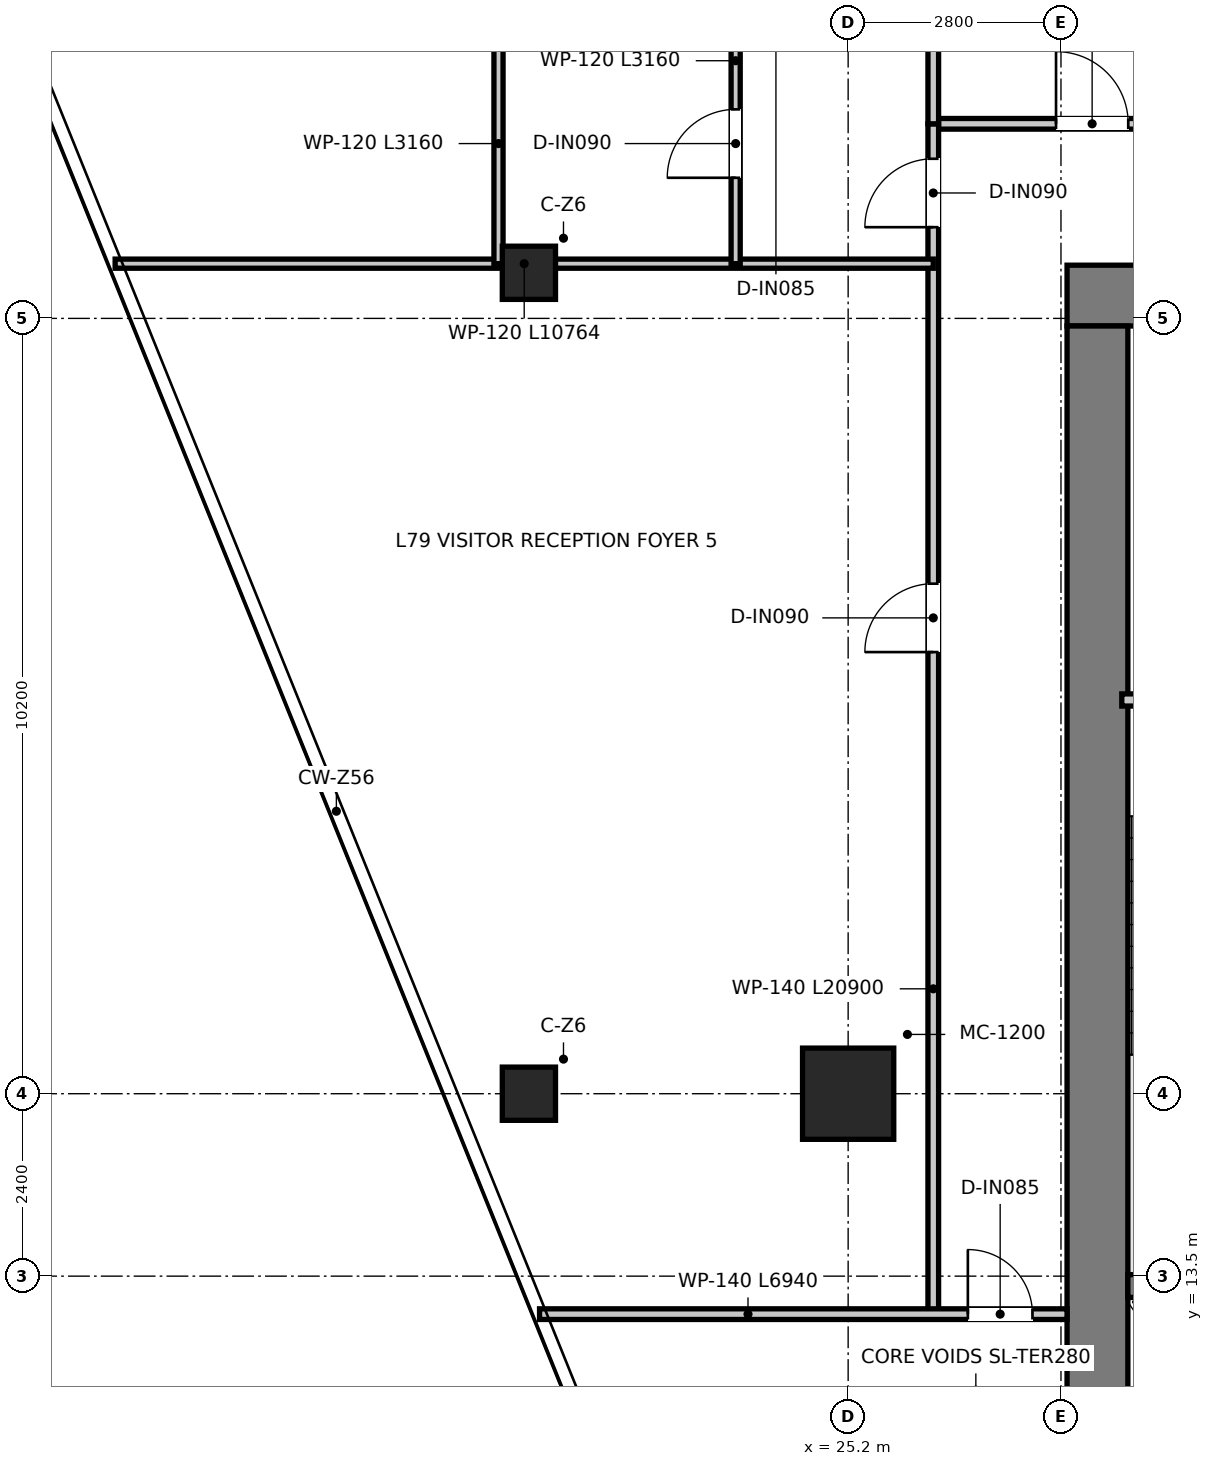
"""IFC4 building model, lengths in metres.
Left out: names, types, materials, properties, quantities, classifications, styles, units other than length and angle.
Written with IfcOpenShell. Run it as: python <this file> out.ifc"""

import sys

from ifc_helpers import new_model, si_unit, direction, frame, frame_2d, origin, origin_2d, place, context, subcontext, project, spatial, rectangle, extrude, source, transform, mapped, element, fill, save


model = new_model("IFC4")
c1 = context("Model", 3, precision=1e-05, world=origin(), true_north=direction((0.0, 1.0)))
c2 = subcontext(c1, "Body", "Model", "MODEL_VIEW")
j1 = project(units=[si_unit("LENGTHUNIT", "METRE"), si_unit("PLANEANGLEUNIT", "RADIAN")], contexts=[c1])
p1 = place(None, origin())
s1 = spatial("IfcSite", under=j1, at=p1, CompositionType="ELEMENT")
p2 = place(p1, origin())
s2 = spatial("IfcBuilding", under=s1, at=p2, CompositionType="ELEMENT")
p3 = place(p2, frame((0.0, 0.0, 323.75)))
s3 = spatial("IfcBuildingStorey", under=s2, at=p3, CompositionType="ELEMENT", Elevation=323.75)
p4 = place(p3, frame((28.08, 26.4, 0.0), z_axis=(0.0, 0.0, 1.0), x_axis=(1.0, 0.0, 0.0)))
e1 = element("IfcWall", 1, at=p4, inside=s3, PredefinedType="SHEAR", context=c2, shape_type="SweptSolid", body=[
    extrude(rectangle(XDim=15.84, YDim=0.8, at=frame_2d((7.92, 0.0))), origin(), (0.0, 0.0, 1.0), 3.95),
])
p5 = place(p4, frame((7.22, 0.0, 0.0)))
e2 = element("IfcOpeningElement", 2, at=p5, cuts=e1, PredefinedType="OPENING", context=c2, shape_type="SweptSolid", body=[
    extrude(rectangle(XDim=1.4, YDim=2.2, at=frame_2d((0.7, 1.1))), frame((0.0, 0.41, 0.0), z_axis=(0.0, -1.0, 0.0), x_axis=(1.0, 0.0, 0.0)), (0.0, 0.0, 1.0), 0.82),
])
p6 = place(p4, frame((1.775, 0.0, 0.0)))
e3 = element("IfcOpeningElement", 3, at=p6, cuts=e1, PredefinedType="OPENING", context=c2, shape_type="SweptSolid", body=[
    extrude(rectangle(XDim=1.05, YDim=2.1, at=frame_2d((0.525, 1.05))), frame((0.0, 0.41, 0.0), z_axis=(0.0, -1.0, 0.0), x_axis=(1.0, 0.0, 0.0)), (0.0, 0.0, 1.0), 0.82),
])
p7 = place(p4, frame((13.015, 0.0, 0.0)))
e4 = element("IfcOpeningElement", 4, at=p7, cuts=e1, PredefinedType="OPENING", context=c2, shape_type="SweptSolid", body=[
    extrude(rectangle(XDim=1.05, YDim=2.1, at=frame_2d((0.525, 1.05))), frame((0.0, 0.41, 0.0), z_axis=(0.0, -1.0, 0.0), x_axis=(1.0, 0.0, 0.0)), (0.0, 0.0, 1.0), 0.82),
])
p8 = place(p3, frame((28.48, 11.3, 0.0), z_axis=(0.0, 0.0, 1.0), x_axis=(0.0, 1.0, 0.0)))
e5 = element("IfcWall", 5, at=p8, inside=s3, PredefinedType="SHEAR", context=c2, shape_type="SweptSolid", body=[
    extrude(rectangle(XDim=14.7, YDim=0.8, at=frame_2d((7.35, 0.0))), origin(), (0.0, 0.0, 1.0), 3.95),
])
p9 = place(p3, frame((28.88, 13.37, 0.0), z_axis=(0.0, 0.0, 1.0), x_axis=(1.0, 0.0, 0.0)))
e6 = element("IfcWall", 6, at=p9, inside=s3, PredefinedType="SHEAR", context=c2, shape_type="SweptSolid", body=[
    extrude(rectangle(XDim=3.1, YDim=0.3, at=frame_2d((1.55, 0.0))), origin(), (0.0, 0.0, 1.0), 3.95),
])
m1 = source(origin(), c2, "Body", "SweptSolid", [
    extrude(rectangle(XDim=1.2, YDim=1.2, at=origin_2d()), origin(), (0.0, 0.0, 1.0), 3.95),
])
p10 = place(p3, frame((25.2, 15.9, 0.0), z_axis=(0.0, 0.0, 1.0), x_axis=(1.0, 0.0, 0.0)))
e7 = element("IfcColumn", 7, at=p10, inside=s3, PredefinedType="USERDEFINED", context=c2, shape_type="MappedRepresentation", body=[
    mapped(m1, transform((0.0, 0.0, 0.0), x_axis=(1.0, 0.0, 0.0), y_axis=(0.0, 1.0, 0.0), z_axis=(0.0, 0.0, 1.0), scale=1.0)),
])
m2 = source(origin(), c2, "Body", "SweptSolid", [
    extrude(rectangle(XDim=0.7, YDim=0.7, at=origin_2d()), origin(), (0.0, 0.0, 1.0), 3.95),
])
for number, where, z_axis, x_axis in (
    (8, (21.0, 15.9, 0.0), (0.0, 0.0, 1.0), (1.0, 0.0, 0.0)),
    (9, (21.0, 26.7, 0.0), (0.0, 0.0, 1.0), (1.0, 0.0, 0.0)),
):
    element("IfcColumn", number, at=place(p3, frame(where, z_axis=z_axis, x_axis=x_axis)), inside=s3, PredefinedType="COLUMN", context=c2, shape_type="MappedRepresentation", body=[
        mapped(m2, transform((0.0, 0.0, 0.0), x_axis=(1.0, 0.0, 0.0), y_axis=(0.0, 1.0, 0.0), z_axis=(0.0, 0.0, 1.0), scale=1.0)),
    ])
p11 = place(p3, frame((28.8, 21.08, 0.0), z_axis=(0.0, 0.0, 1.0), x_axis=(1.0, 0.0, 0.0)))
e10 = element("IfcWall", 10, at=p11, inside=s3, PredefinedType="PARTITIONING", context=c2, shape_type="SweptSolid", body=[
    extrude(rectangle(XDim=3.16, YDim=0.16, at=frame_2d((1.58, 0.0))), origin(), (0.0, 0.0, 1.0), 3.67),
])
p12 = place(p11, frame((1.055, 0.0, 0.0)))
e11 = element("IfcOpeningElement", 11, at=p12, cuts=e10, PredefinedType="OPENING", context=c2, shape_type="SweptSolid", body=[
    extrude(rectangle(XDim=1.05, YDim=2.1, at=frame_2d((0.525, 1.05))), frame((0.0, 0.09, 0.0), z_axis=(0.0, -1.0, 0.0), x_axis=(1.0, 0.0, 0.0)), (0.0, 0.0, 1.0), 0.18),
])
p13 = place(p3, frame((26.32, 28.66, 0.0), z_axis=(0.0, 0.0, 1.0), x_axis=(1.0, 0.0, 0.0)))
e12 = element("IfcWall", 12, at=p13, inside=s3, PredefinedType="PARTITIONING", context=c2, shape_type="SweptSolid", body=[
    extrude(rectangle(XDim=19.36, YDim=0.14, at=frame_2d((9.68, 0.0))), origin(), (0.0, 0.0, 1.0), 3.18),
])
p14 = place(p13, frame((1.615, 0.0, 0.0)))
e13 = element("IfcOpeningElement", 13, at=p14, cuts=e12, PredefinedType="OPENING", context=c2, shape_type="SweptSolid", body=[
    extrude(rectangle(XDim=0.95, YDim=2.1, at=frame_2d((0.475, 1.05))), frame((0.0, 0.08, 0.0), z_axis=(0.0, -1.0, 0.0), x_axis=(1.0, 0.0, 0.0)), (0.0, 0.0, 1.0), 0.16),
])
p15 = place(p13, frame((6.705, 0.0, 0.0)))
e14 = element("IfcOpeningElement", 14, at=p15, cuts=e12, PredefinedType="OPENING", context=c2, shape_type="SweptSolid", body=[
    extrude(rectangle(XDim=0.95, YDim=2.1, at=frame_2d((0.475, 1.05))), frame((0.0, 0.08, 0.0), z_axis=(0.0, -1.0, 0.0), x_axis=(1.0, 0.0, 0.0)), (0.0, 0.0, 1.0), 0.16),
])
p16 = place(p13, frame((12.455, 0.0, 0.0)))
e15 = element("IfcOpeningElement", 15, at=p16, cuts=e12, PredefinedType="OPENING", context=c2, shape_type="SweptSolid", body=[
    extrude(rectangle(XDim=0.95, YDim=2.1, at=frame_2d((0.475, 1.05))), frame((0.0, 0.08, 0.0), z_axis=(0.0, -1.0, 0.0), x_axis=(1.0, 0.0, 0.0)), (0.0, 0.0, 1.0), 0.16),
])
p17 = place(p13, frame((17.045, 0.0, 0.0)))
e16 = element("IfcOpeningElement", 16, at=p17, cuts=e12, PredefinedType="OPENING", context=c2, shape_type="SweptSolid", body=[
    extrude(rectangle(XDim=0.95, YDim=2.1, at=frame_2d((0.475, 1.05))), frame((0.0, 0.08, 0.0), z_axis=(0.0, -1.0, 0.0), x_axis=(1.0, 0.0, 0.0)), (0.0, 0.0, 1.0), 0.16),
])
p18 = place(p3, frame((26.32, 13.0, 0.0), z_axis=(0.0, 0.0, 1.0), x_axis=(0.0, 1.0, 0.0)))
e17 = element("IfcWall", 17, at=p18, inside=s3, PredefinedType="PARTITIONING", context=c2, shape_type="SweptSolid", body=[
    extrude(rectangle(XDim=15.66, YDim=0.14, at=frame_2d((7.83, 0.0))), origin(), (0.0, 0.0, 1.0), 3.13),
])
p19 = place(p18, frame((14.3, 0.0, 0.0)))
e18 = element("IfcOpeningElement", 18, at=p19, cuts=e17, PredefinedType="OPENING", context=c2, shape_type="SweptSolid", body=[
    extrude(rectangle(XDim=0.9, YDim=2.1, at=frame_2d((0.45, 1.05))), frame((0.0, 0.08, 0.0), z_axis=(0.0, -1.0, 0.0), x_axis=(1.0, 0.0, 0.0)), (0.0, 0.0, 1.0), 0.16),
])
p20 = place(p18, frame((8.71, 0.0, 0.0)))
e19 = element("IfcOpeningElement", 19, at=p20, cuts=e17, PredefinedType="OPENING", context=c2, shape_type="SweptSolid", body=[
    extrude(rectangle(XDim=0.9, YDim=2.1, at=frame_2d((0.45, 1.05))), frame((0.0, 0.08, 0.0), z_axis=(0.0, -1.0, 0.0), x_axis=(1.0, 0.0, 0.0)), (0.0, 0.0, 1.0), 0.16),
])
p21 = place(p3, frame((21.14, 13.0, 0.0), z_axis=(0.0, 0.0, 1.0), x_axis=(1.0, 0.0, 0.0)))
e20 = element("IfcWall", 20, at=p21, inside=s3, PredefinedType="PARTITIONING", context=c2, shape_type="SweptSolid", body=[
    extrude(rectangle(XDim=6.94, YDim=0.14, at=frame_2d((3.47, 0.0))), origin(), (0.0, 0.0, 1.0), 3.18),
])
p22 = place(p21, frame((5.635, 0.0, 0.0)))
e21 = element("IfcOpeningElement", 21, at=p22, cuts=e20, PredefinedType="OPENING", context=c2, shape_type="SweptSolid", body=[
    extrude(rectangle(XDim=0.85, YDim=2.1, at=frame_2d((0.425, 1.05))), frame((0.0, 0.08, 0.0), z_axis=(0.0, -1.0, 0.0), x_axis=(1.0, 0.0, 0.0)), (0.0, 0.0, 1.0), 0.16),
])
p23 = place(p3, frame((15.556, 26.82, 0.0), z_axis=(0.0, 0.0, 1.0), x_axis=(1.0, 0.0, 0.0)))
e22 = element("IfcWall", 22, at=p23, inside=s3, PredefinedType="PARTITIONING", context=c2, shape_type="SweptSolid", body=[
    extrude(rectangle(XDim=10.764, YDim=0.12, at=frame_2d((5.382, 0.0))), origin(), (0.0, 0.0, 1.0), 3.13),
])
p24 = place(p3, frame((20.6, 26.82, 0.0), z_axis=(0.0, 0.0, 1.0), x_axis=(0.0, 1.0, 0.0)))
e23 = element("IfcWall", 23, at=p24, inside=s3, PredefinedType="PARTITIONING", context=c2, shape_type="SweptSolid", body=[
    extrude(rectangle(XDim=3.16, YDim=0.12, at=frame_2d((1.58, 0.0))), origin(), (0.0, 0.0, 1.0), 3.67),
])
p25 = place(p3, frame((23.72, 26.82, 0.0), z_axis=(0.0, 0.0, 1.0), x_axis=(0.0, 1.0, 0.0)))
e24 = element("IfcWall", 24, at=p25, inside=s3, PredefinedType="PARTITIONING", context=c2, shape_type="SweptSolid", body=[
    extrude(rectangle(XDim=3.16, YDim=0.12, at=frame_2d((1.58, 0.0))), origin(), (0.0, 0.0, 1.0), 3.18),
])
p26 = place(p25, frame((1.13, 0.0, 0.0)))
e25 = element("IfcOpeningElement", 25, at=p26, cuts=e24, PredefinedType="OPENING", context=c2, shape_type="SweptSolid", body=[
    extrude(rectangle(XDim=0.9, YDim=2.1, at=frame_2d((0.45, 1.05))), frame((0.0, 0.07, 0.0), z_axis=(0.0, -1.0, 0.0), x_axis=(1.0, 0.0, 0.0)), (0.0, 0.0, 1.0), 0.14),
])
p27 = place(p3, frame((26.32, 28.66, 0.0), z_axis=(0.0, 0.0, 1.0), x_axis=(0.0, 1.0, 0.0)))
e26 = element("IfcWall", 26, at=p27, inside=s3, PredefinedType="PARTITIONING", context=c2, shape_type="SweptSolid", body=[
    extrude(rectangle(XDim=5.24, YDim=0.14, at=frame_2d((2.62, 0.0))), origin(), (0.0, 0.0, 1.0), 3.43),
])
p28 = place(p19, origin())
e27 = element("IfcDoor", 27, at=p28, inside=s3, OperationType="SINGLE_SWING_LEFT", PredefinedType="DOOR", context=c2, shape_type="SweptSolid", body=[
    extrude(rectangle(XDim=0.9, YDim=2.1, at=frame_2d((0.45, 1.05))), frame((0.0, 0.025, 0.0), z_axis=(0.0, -1.0, 0.0), x_axis=(1.0, 0.0, 0.0)), (0.0, 0.0, 1.0), 0.05),
])
fill(e18, e27)
p29 = place(p26, origin())
e28 = element("IfcDoor", 28, at=p29, inside=s3, OperationType="SINGLE_SWING_LEFT", PredefinedType="DOOR", context=c2, shape_type="SweptSolid", body=[
    extrude(rectangle(XDim=0.9, YDim=2.1, at=frame_2d((0.45, 1.05))), frame((0.0, 0.025, 0.0), z_axis=(0.0, -1.0, 0.0), x_axis=(1.0, 0.0, 0.0)), (0.0, 0.0, 1.0), 0.05),
])
fill(e25, e28)
p30 = place(p14, origin())
e29 = element("IfcDoor", 29, at=p30, inside=s3, OperationType="SINGLE_SWING_LEFT", PredefinedType="DOOR", context=c2, shape_type="SweptSolid", body=[
    extrude(rectangle(XDim=0.95, YDim=2.1, at=frame_2d((0.475, 1.05))), frame((0.0, 0.025, 0.0), z_axis=(0.0, -1.0, 0.0), x_axis=(1.0, 0.0, 0.0)), (0.0, 0.0, 1.0), 0.05),
])
fill(e13, e29)
p31 = place(p20, origin())
e30 = element("IfcDoor", 30, at=p31, inside=s3, OperationType="SINGLE_SWING_LEFT", PredefinedType="DOOR", context=c2, shape_type="SweptSolid", body=[
    extrude(rectangle(XDim=0.9, YDim=2.1, at=frame_2d((0.45, 1.05))), frame((0.0, 0.025, 0.0), z_axis=(0.0, -1.0, 0.0), x_axis=(1.0, 0.0, 0.0)), (0.0, 0.0, 1.0), 0.05),
])
fill(e19, e30)
p32 = place(p22, origin())
e31 = element("IfcDoor", 31, at=p32, inside=s3, OperationType="SINGLE_SWING_LEFT", PredefinedType="DOOR", context=c2, shape_type="SweptSolid", body=[
    extrude(rectangle(XDim=0.85, YDim=2.1, at=frame_2d((0.425, 1.05))), frame((0.0, 0.025, 0.0), z_axis=(0.0, -1.0, 0.0), x_axis=(1.0, 0.0, 0.0)), (0.0, 0.0, 1.0), 0.05),
])
fill(e21, e31)
save(model, sys.argv[1])
